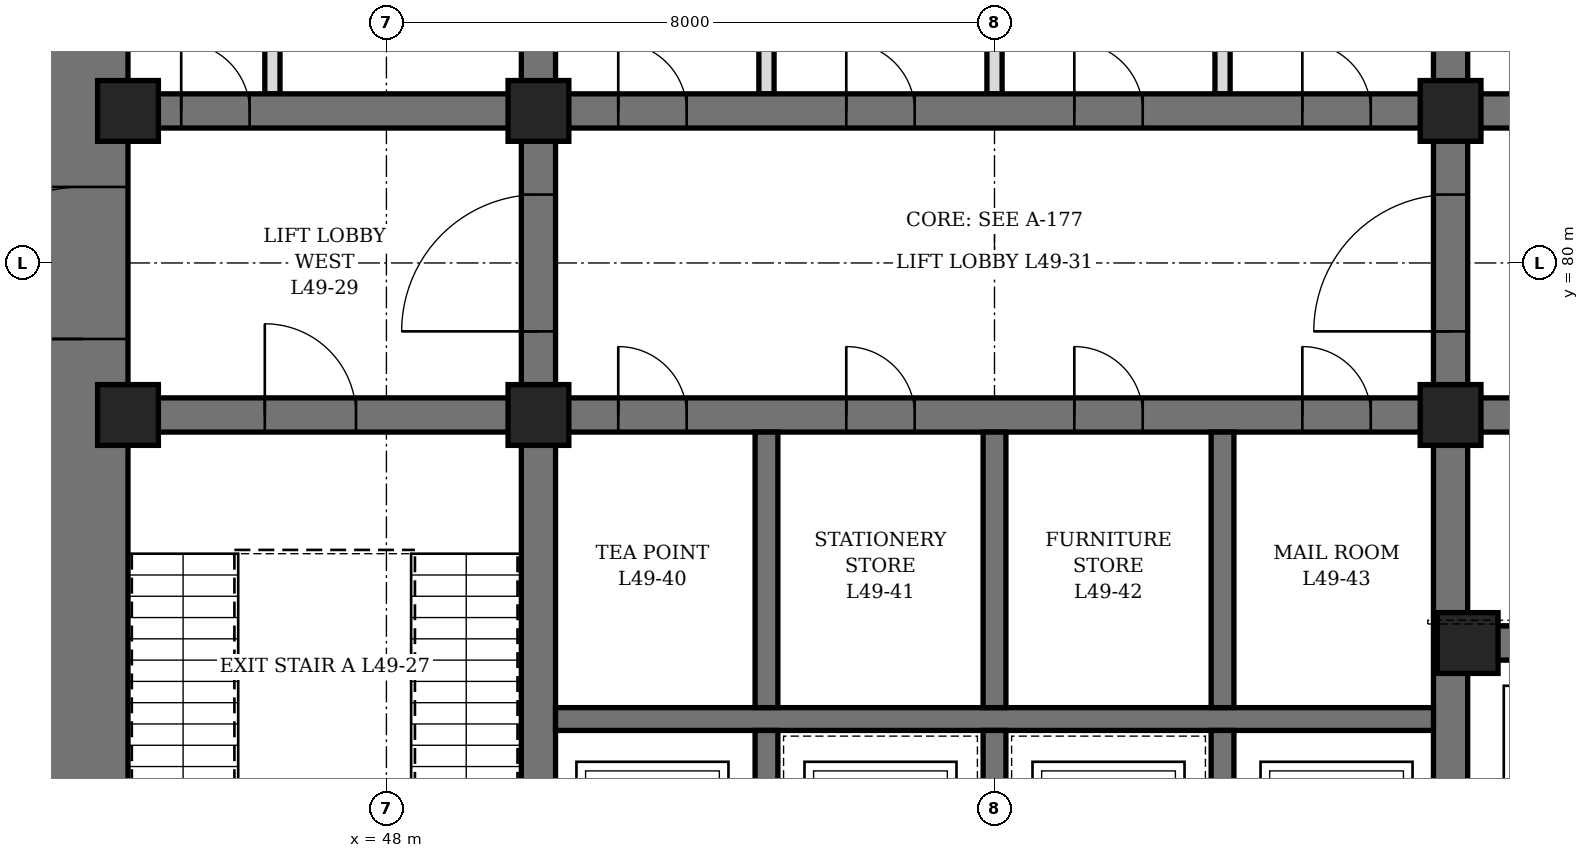
"""IFC4 building model, lengths in metres.
Left out: names, types, materials, properties, quantities, classifications, styles, units other than length and angle.
Written with IfcOpenShell. Run it as: python <this file> out.ifc"""

import sys

from ifc_helpers import new_model, si_unit, direction, frame, frame_2d, origin, origin_2d, place, context, subcontext, project, spatial, rectangle, hollow_rectangle, extrude, element, fill, save


model = new_model("IFC4")
c1 = context("Model", 3, precision=1e-05, world=origin(), true_north=direction((0.0, 1.0)))
c2 = subcontext(c1, "Body", "Model", "MODEL_VIEW")
j1 = project(units=[si_unit("LENGTHUNIT", "METRE"), si_unit("PLANEANGLEUNIT", "RADIAN")], contexts=[c1])
p1 = place(None, origin())
s1 = spatial("IfcSite", under=j1, at=p1, CompositionType="ELEMENT")
p2 = place(p1, origin())
s2 = spatial("IfcBuilding", under=s1, at=p2, CompositionType="ELEMENT")
p3 = place(p2, frame((0.0, 0.0, 219.1)))
s3 = spatial("IfcBuildingStorey", under=s2, at=p3, CompositionType="ELEMENT", Elevation=219.1)
p4 = place(p3, frame((44.0, 70.4, 0.0), z_axis=(0.0, 0.0, 1.0), x_axis=(0.0, 1.0, 0.0)))
e1 = element("IfcWall", 1, at=p4, inside=s3, PredefinedType="SHEAR", context=c2, shape_type="SweptSolid", body=[
    extrude(rectangle(XDim=19.2, YDim=1.2, at=frame_2d((9.6, 0.0))), origin(), (0.0, 0.0, 1.0), 4.2),
])
p5 = place(p4, frame((8.6, 0.0, 0.0)))
e2 = element("IfcOpeningElement", 2, at=p5, cuts=e1, PredefinedType="OPENING", context=c2, shape_type="SweptSolid", body=[
    extrude(rectangle(XDim=2.0, YDim=2.4, at=frame_2d((1.0, 1.2))), frame((0.0, 0.61, 0.0), z_axis=(0.0, -1.0, 0.0), x_axis=(1.0, 0.0, 0.0)), (0.0, 0.0, 1.0), 1.22),
])
p6 = place(p3, frame((50.0, 71.6, 0.0), z_axis=(0.0, 0.0, 1.0), x_axis=(0.0, 1.0, 0.0)))
e3 = element("IfcWall", 3, at=p6, inside=s3, PredefinedType="SHEAR", context=c2, shape_type="SweptSolid", body=[
    extrude(rectangle(XDim=16.8, YDim=0.45, at=frame_2d((8.4, 0.0))), origin(), (0.0, 0.0, 1.0), 4.2),
])
p7 = place(p6, frame((7.5, 0.0, 0.0)))
e4 = element("IfcOpeningElement", 4, at=p7, cuts=e3, PredefinedType="OPENING", context=c2, shape_type="SweptSolid", body=[
    extrude(rectangle(XDim=1.8, YDim=2.4, at=frame_2d((0.9, 1.2))), frame((0.0, 0.235, 0.0), z_axis=(0.0, -1.0, 0.0), x_axis=(1.0, 0.0, 0.0)), (0.0, 0.0, 1.0), 0.47),
])
p8 = place(p3, frame((62.0, 71.6, 0.0), z_axis=(0.0, 0.0, 1.0), x_axis=(0.0, 1.0, 0.0)))
e5 = element("IfcWall", 5, at=p8, inside=s3, PredefinedType="SHEAR", context=c2, shape_type="SweptSolid", body=[
    extrude(rectangle(XDim=16.8, YDim=0.45, at=frame_2d((8.4, 0.0))), origin(), (0.0, 0.0, 1.0), 4.2),
])
p9 = place(p8, frame((7.5, 0.0, 0.0)))
e6 = element("IfcOpeningElement", 6, at=p9, cuts=e5, PredefinedType="OPENING", context=c2, shape_type="SweptSolid", body=[
    extrude(rectangle(XDim=1.8, YDim=2.4, at=frame_2d((0.9, 1.2))), frame((0.0, 0.235, 0.0), z_axis=(0.0, -1.0, 0.0), x_axis=(1.0, 0.0, 0.0)), (0.0, 0.0, 1.0), 0.47),
])
p10 = place(p3, frame((44.6, 78.0, 0.0), z_axis=(0.0, 0.0, 1.0), x_axis=(1.0, 0.0, 0.0)))
e7 = element("IfcWall", 7, at=p10, inside=s3, PredefinedType="SHEAR", context=c2, shape_type="SweptSolid", body=[
    extrude(rectangle(XDim=5.175, YDim=0.45, at=frame_2d((2.587, 0.0))), origin(), (0.0, 0.0, 1.0), 4.2),
])
p11 = place(p10, frame((1.8, 0.0, 0.0)))
e8 = element("IfcOpeningElement", 8, at=p11, cuts=e7, PredefinedType="OPENING", context=c2, shape_type="SweptSolid", body=[
    extrude(rectangle(XDim=1.2, YDim=2.1, at=frame_2d((0.6, 1.05))), frame((0.0, 0.235, 0.0), z_axis=(0.0, -1.0, 0.0), x_axis=(1.0, 0.0, 0.0)), (0.0, 0.0, 1.0), 0.47),
])
p12 = place(p3, frame((44.6, 82.0, 0.0), z_axis=(0.0, 0.0, 1.0), x_axis=(1.0, 0.0, 0.0)))
e9 = element("IfcWall", 9, at=p12, inside=s3, PredefinedType="SHEAR", context=c2, shape_type="SweptSolid", body=[
    extrude(rectangle(XDim=5.175, YDim=0.45, at=frame_2d((2.587, 0.0))), origin(), (0.0, 0.0, 1.0), 4.2),
])
p13 = place(p12, frame((0.7, 0.0, 0.0)))
e10 = element("IfcOpeningElement", 10, at=p13, cuts=e9, PredefinedType="OPENING", context=c2, shape_type="SweptSolid", body=[
    extrude(rectangle(XDim=0.9, YDim=2.1, at=frame_2d((0.45, 1.05))), frame((0.0, 0.235, 0.0), z_axis=(0.0, -1.0, 0.0), x_axis=(1.0, 0.0, 0.0)), (0.0, 0.0, 1.0), 0.47),
])
p14 = place(p3, frame((62.225, 75.0, 0.0), z_axis=(0.0, 0.0, 1.0), x_axis=(1.0, 0.0, 0.0)))
e11 = element("IfcWall", 11, at=p14, inside=s3, PredefinedType="SHEAR", context=c2, shape_type="SweptSolid", body=[
    extrude(rectangle(XDim=5.175, YDim=0.45, at=frame_2d((2.587, 0.0))), origin(), (0.0, 0.0, 1.0), 4.2),
])
p15 = place(p14, frame((0.675, 0.0, 0.0)))
e12 = element("IfcOpeningElement", 12, at=p15, cuts=e11, PredefinedType="OPENING", context=c2, shape_type="SweptSolid", body=[
    extrude(rectangle(XDim=1.2, YDim=2.2, at=frame_2d((0.6, 1.1))), frame((0.0, 0.235, 0.0), z_axis=(0.0, -1.0, 0.0), x_axis=(1.0, 0.0, 0.0)), (0.0, 0.0, 1.0), 0.47),
])
p16 = place(p14, frame((3.425, 0.0, 0.0)))
e13 = element("IfcOpeningElement", 13, at=p16, cuts=e11, PredefinedType="OPENING", context=c2, shape_type="SweptSolid", body=[
    extrude(rectangle(XDim=1.2, YDim=2.2, at=frame_2d((0.6, 1.1))), frame((0.0, 0.235, 0.0), z_axis=(0.0, -1.0, 0.0), x_axis=(1.0, 0.0, 0.0)), (0.0, 0.0, 1.0), 0.47),
])
p17 = place(p3, frame((62.225, 78.0, 0.0), z_axis=(0.0, 0.0, 1.0), x_axis=(1.0, 0.0, 0.0)))
e14 = element("IfcWall", 14, at=p17, inside=s3, PredefinedType="SHEAR", context=c2, shape_type="SweptSolid", body=[
    extrude(rectangle(XDim=5.175, YDim=0.45, at=frame_2d((2.587, 0.0))), origin(), (0.0, 0.0, 1.0), 4.2),
])
p18 = place(p17, frame((2.175, 0.0, 0.0)))
e15 = element("IfcOpeningElement", 15, at=p18, cuts=e14, PredefinedType="OPENING", context=c2, shape_type="SweptSolid", body=[
    extrude(rectangle(XDim=1.2, YDim=2.1, at=frame_2d((0.6, 1.05))), frame((0.0, 0.235, 0.0), z_axis=(0.0, -1.0, 0.0), x_axis=(1.0, 0.0, 0.0)), (0.0, 0.0, 1.0), 0.47),
])
p19 = place(p3, frame((62.225, 82.0, 0.0), z_axis=(0.0, 0.0, 1.0), x_axis=(1.0, 0.0, 0.0)))
e16 = element("IfcWall", 16, at=p19, inside=s3, PredefinedType="SHEAR", context=c2, shape_type="SweptSolid", body=[
    extrude(rectangle(XDim=5.175, YDim=0.45, at=frame_2d((2.587, 0.0))), origin(), (0.0, 0.0, 1.0), 4.2),
])
p20 = place(p19, frame((2.175, 0.0, 0.0)))
e17 = element("IfcOpeningElement", 17, at=p20, cuts=e16, PredefinedType="OPENING", context=c2, shape_type="SweptSolid", body=[
    extrude(rectangle(XDim=1.2, YDim=2.1, at=frame_2d((0.6, 1.05))), frame((0.0, 0.235, 0.0), z_axis=(0.0, -1.0, 0.0), x_axis=(1.0, 0.0, 0.0)), (0.0, 0.0, 1.0), 0.47),
])
p21 = place(p3, frame((50.225, 78.0, 0.0), z_axis=(0.0, 0.0, 1.0), x_axis=(1.0, 0.0, 0.0)))
e18 = element("IfcWall", 18, at=p21, inside=s3, PredefinedType="SHEAR", context=c2, shape_type="SweptSolid", body=[
    extrude(rectangle(XDim=11.55, YDim=0.45, at=frame_2d((5.775, 0.0))), origin(), (0.0, 0.0, 1.0), 4.2),
])
p22 = place(p21, frame((0.825, 0.0, 0.0)))
e19 = element("IfcOpeningElement", 19, at=p22, cuts=e18, PredefinedType="OPENING", context=c2, shape_type="SweptSolid", body=[
    extrude(rectangle(XDim=0.9, YDim=2.1, at=frame_2d((0.45, 1.05))), frame((0.0, 0.235, 0.0), z_axis=(0.0, -1.0, 0.0), x_axis=(1.0, 0.0, 0.0)), (0.0, 0.0, 1.0), 0.47),
])
p23 = place(p21, frame((3.825, 0.0, 0.0)))
e20 = element("IfcOpeningElement", 20, at=p23, cuts=e18, PredefinedType="OPENING", context=c2, shape_type="SweptSolid", body=[
    extrude(rectangle(XDim=0.9, YDim=2.1, at=frame_2d((0.45, 1.05))), frame((0.0, 0.235, 0.0), z_axis=(0.0, -1.0, 0.0), x_axis=(1.0, 0.0, 0.0)), (0.0, 0.0, 1.0), 0.47),
])
p24 = place(p21, frame((6.825, 0.0, 0.0)))
e21 = element("IfcOpeningElement", 21, at=p24, cuts=e18, PredefinedType="OPENING", context=c2, shape_type="SweptSolid", body=[
    extrude(rectangle(XDim=0.9, YDim=2.1, at=frame_2d((0.45, 1.05))), frame((0.0, 0.235, 0.0), z_axis=(0.0, -1.0, 0.0), x_axis=(1.0, 0.0, 0.0)), (0.0, 0.0, 1.0), 0.47),
])
p25 = place(p21, frame((9.825, 0.0, 0.0)))
e22 = element("IfcOpeningElement", 22, at=p25, cuts=e18, PredefinedType="OPENING", context=c2, shape_type="SweptSolid", body=[
    extrude(rectangle(XDim=0.9, YDim=2.1, at=frame_2d((0.45, 1.05))), frame((0.0, 0.235, 0.0), z_axis=(0.0, -1.0, 0.0), x_axis=(1.0, 0.0, 0.0)), (0.0, 0.0, 1.0), 0.47),
])
p26 = place(p3, frame((50.225, 82.0, 0.0), z_axis=(0.0, 0.0, 1.0), x_axis=(1.0, 0.0, 0.0)))
e23 = element("IfcWall", 23, at=p26, inside=s3, PredefinedType="SHEAR", context=c2, shape_type="SweptSolid", body=[
    extrude(rectangle(XDim=11.55, YDim=0.45, at=frame_2d((5.775, 0.0))), origin(), (0.0, 0.0, 1.0), 4.2),
])
p27 = place(p26, frame((0.825, 0.0, 0.0)))
e24 = element("IfcOpeningElement", 24, at=p27, cuts=e23, PredefinedType="OPENING", context=c2, shape_type="SweptSolid", body=[
    extrude(rectangle(XDim=0.9, YDim=2.1, at=frame_2d((0.45, 1.05))), frame((0.0, 0.235, 0.0), z_axis=(0.0, -1.0, 0.0), x_axis=(1.0, 0.0, 0.0)), (0.0, 0.0, 1.0), 0.47),
])
p28 = place(p26, frame((3.825, 0.0, 0.0)))
e25 = element("IfcOpeningElement", 25, at=p28, cuts=e23, PredefinedType="OPENING", context=c2, shape_type="SweptSolid", body=[
    extrude(rectangle(XDim=0.9, YDim=2.1, at=frame_2d((0.45, 1.05))), frame((0.0, 0.235, 0.0), z_axis=(0.0, -1.0, 0.0), x_axis=(1.0, 0.0, 0.0)), (0.0, 0.0, 1.0), 0.47),
])
p29 = place(p26, frame((6.825, 0.0, 0.0)))
e26 = element("IfcOpeningElement", 26, at=p29, cuts=e23, PredefinedType="OPENING", context=c2, shape_type="SweptSolid", body=[
    extrude(rectangle(XDim=0.9, YDim=2.1, at=frame_2d((0.45, 1.05))), frame((0.0, 0.235, 0.0), z_axis=(0.0, -1.0, 0.0), x_axis=(1.0, 0.0, 0.0)), (0.0, 0.0, 1.0), 0.47),
])
p30 = place(p26, frame((9.825, 0.0, 0.0)))
e27 = element("IfcOpeningElement", 27, at=p30, cuts=e23, PredefinedType="OPENING", context=c2, shape_type="SweptSolid", body=[
    extrude(rectangle(XDim=0.9, YDim=2.1, at=frame_2d((0.45, 1.05))), frame((0.0, 0.235, 0.0), z_axis=(0.0, -1.0, 0.0), x_axis=(1.0, 0.0, 0.0)), (0.0, 0.0, 1.0), 0.47),
])
p31 = place(p3, frame((50.225, 74.0, 0.0), z_axis=(0.0, 0.0, 1.0), x_axis=(1.0, 0.0, 0.0)))
e28 = element("IfcWall", 28, at=p31, inside=s3, PredefinedType="SHEAR", context=c2, shape_type="SweptSolid", body=[
    extrude(rectangle(XDim=11.55, YDim=0.3, at=frame_2d((5.775, 0.0))), origin(), (0.0, 0.0, 1.0), 4.2),
])
p32 = place(p3, frame((53.0, 71.6, 0.0), z_axis=(0.0, 0.0, 1.0), x_axis=(0.0, 1.0, 0.0)))
e29 = element("IfcWall", 29, at=p32, inside=s3, PredefinedType="SHEAR", context=c2, shape_type="SweptSolid", body=[
    extrude(rectangle(XDim=2.25, YDim=0.3, at=frame_2d((1.125, 0.0))), origin(), (0.0, 0.0, 1.0), 4.2),
])
p33 = place(p3, frame((53.0, 74.15, 0.0), z_axis=(0.0, 0.0, 1.0), x_axis=(0.0, 1.0, 0.0)))
e30 = element("IfcWall", 30, at=p33, inside=s3, PredefinedType="SHEAR", context=c2, shape_type="SweptSolid", body=[
    extrude(rectangle(XDim=3.625, YDim=0.3, at=frame_2d((1.812, 0.0))), origin(), (0.0, 0.0, 1.0), 4.2),
])
p34 = place(p3, frame((56.0, 71.6, 0.0), z_axis=(0.0, 0.0, 1.0), x_axis=(0.0, 1.0, 0.0)))
e31 = element("IfcWall", 31, at=p34, inside=s3, PredefinedType="SHEAR", context=c2, shape_type="SweptSolid", body=[
    extrude(rectangle(XDim=2.25, YDim=0.3, at=frame_2d((1.125, 0.0))), origin(), (0.0, 0.0, 1.0), 4.2),
])
p35 = place(p3, frame((56.0, 74.15, 0.0), z_axis=(0.0, 0.0, 1.0), x_axis=(0.0, 1.0, 0.0)))
e32 = element("IfcWall", 32, at=p35, inside=s3, PredefinedType="SHEAR", context=c2, shape_type="SweptSolid", body=[
    extrude(rectangle(XDim=3.625, YDim=0.3, at=frame_2d((1.812, 0.0))), origin(), (0.0, 0.0, 1.0), 4.2),
])
p36 = place(p3, frame((59.0, 71.6, 0.0), z_axis=(0.0, 0.0, 1.0), x_axis=(0.0, 1.0, 0.0)))
e33 = element("IfcWall", 33, at=p36, inside=s3, PredefinedType="SHEAR", context=c2, shape_type="SweptSolid", body=[
    extrude(rectangle(XDim=2.25, YDim=0.3, at=frame_2d((1.125, 0.0))), origin(), (0.0, 0.0, 1.0), 4.2),
])
p37 = place(p3, frame((59.0, 74.15, 0.0), z_axis=(0.0, 0.0, 1.0), x_axis=(0.0, 1.0, 0.0)))
e34 = element("IfcWall", 34, at=p37, inside=s3, PredefinedType="SHEAR", context=c2, shape_type="SweptSolid", body=[
    extrude(rectangle(XDim=3.625, YDim=0.3, at=frame_2d((1.812, 0.0))), origin(), (0.0, 0.0, 1.0), 4.2),
])
for number, where, z_axis, x_axis in (
    (35, (44.6, 78.0, 0.0), (0.0, 0.0, 1.0), (1.0, 0.0, 0.0)),
    (36, (44.6, 82.0, 0.0), (0.0, 0.0, 1.0), (1.0, 0.0, 0.0)),
    (37, (50.0, 78.0, 0.0), (0.0, 0.0, 1.0), (1.0, 0.0, 0.0)),
    (38, (50.0, 82.0, 0.0), (0.0, 0.0, 1.0), (1.0, 0.0, 0.0)),
    (39, (62.0, 78.0, 0.0), (0.0, 0.0, 1.0), (1.0, 0.0, 0.0)),
    (40, (62.0, 82.0, 0.0), (0.0, 0.0, 1.0), (1.0, 0.0, 0.0)),
    (41, (62.225, 75.0, 0.0), (0.0, 0.0, 1.0), (1.0, 0.0, 0.0)),
):
    element("IfcColumn", number, at=place(p3, frame(where, z_axis=z_axis, x_axis=x_axis)), inside=s3, PredefinedType="COLUMN", context=c2, shape_type="SweptSolid", body=[
        extrude(hollow_rectangle(XDim=0.8, YDim=0.8, WallThickness=0.1, at=origin_2d()), origin(), (0.0, 0.0, 1.0), 4.2),
    ])
p38 = place(p3, frame((46.5, 82.225, 0.0), z_axis=(0.0, 0.0, 1.0), x_axis=(0.0, 1.0, 0.0)))
e42 = element("IfcWall", 42, at=p38, inside=s3, PredefinedType="PARTITIONING", context=c2, shape_type="SweptSolid", body=[
    extrude(rectangle(XDim=3.05, YDim=0.2, at=frame_2d((1.525, 0.0))), origin(), (0.0, 0.0, 1.0), 4.04),
])
p39 = place(p38, frame((1.075, 0.0, 0.0)))
e43 = element("IfcOpeningElement", 43, at=p39, cuts=e42, PredefinedType="OPENING", context=c2, shape_type="SweptSolid", body=[
    extrude(rectangle(XDim=0.9, YDim=2.1, at=frame_2d((0.45, 1.05))), frame((0.0, 0.11, 0.0), z_axis=(0.0, -1.0, 0.0), x_axis=(1.0, 0.0, 0.0)), (0.0, 0.0, 1.0), 0.22),
])
p40 = place(p3, frame((53.0, 82.225, 0.0), z_axis=(0.0, 0.0, 1.0), x_axis=(0.0, 1.0, 0.0)))
e44 = element("IfcWall", 44, at=p40, inside=s3, PredefinedType="PARTITIONING", context=c2, shape_type="SweptSolid", body=[
    extrude(rectangle(XDim=3.55, YDim=0.2, at=frame_2d((1.775, 0.0))), origin(), (0.0, 0.0, 1.0), 4.04),
])
p41 = place(p3, frame((56.0, 82.225, 0.0), z_axis=(0.0, 0.0, 1.0), x_axis=(0.0, 1.0, 0.0)))
e45 = element("IfcWall", 45, at=p41, inside=s3, PredefinedType="PARTITIONING", context=c2, shape_type="SweptSolid", body=[
    extrude(rectangle(XDim=3.55, YDim=0.2, at=frame_2d((1.775, 0.0))), origin(), (0.0, 0.0, 1.0), 3.14),
])
p42 = place(p3, frame((59.0, 82.225, 0.0), z_axis=(0.0, 0.0, 1.0), x_axis=(0.0, 1.0, 0.0)))
e46 = element("IfcWall", 46, at=p42, inside=s3, PredefinedType="PARTITIONING", context=c2, shape_type="SweptSolid", body=[
    extrude(rectangle(XDim=3.55, YDim=0.2, at=frame_2d((1.775, 0.0))), origin(), (0.0, 0.0, 1.0), 4.04),
])
p43 = place(p13, origin())
e47 = element("IfcDoor", 47, at=p43, inside=s3, OperationType="SINGLE_SWING_LEFT", PredefinedType="DOOR", context=c2, shape_type="SweptSolid", body=[
    extrude(rectangle(XDim=0.9, YDim=2.1, at=frame_2d((0.45, 1.05))), frame((0.0, 0.225, 0.0), z_axis=(0.0, -1.0, 0.0), x_axis=(1.0, 0.0, 0.0)), (0.0, 0.0, 1.0), 0.449),
])
fill(e10, e47)
p44 = place(p22, origin())
e48 = element("IfcDoor", 48, at=p44, inside=s3, OperationType="SINGLE_SWING_LEFT", PredefinedType="DOOR", context=c2, shape_type="SweptSolid", body=[
    extrude(rectangle(XDim=0.9, YDim=2.1, at=frame_2d((0.45, 1.05))), frame((0.0, 0.225, 0.0), z_axis=(0.0, -1.0, 0.0), x_axis=(1.0, 0.0, 0.0)), (0.0, 0.0, 1.0), 0.449),
])
fill(e19, e48)
p45 = place(p23, origin())
e49 = element("IfcDoor", 49, at=p45, inside=s3, OperationType="SINGLE_SWING_LEFT", PredefinedType="DOOR", context=c2, shape_type="SweptSolid", body=[
    extrude(rectangle(XDim=0.9, YDim=2.1, at=frame_2d((0.45, 1.05))), frame((0.0, 0.225, 0.0), z_axis=(0.0, -1.0, 0.0), x_axis=(1.0, 0.0, 0.0)), (0.0, 0.0, 1.0), 0.449),
])
fill(e20, e49)
p46 = place(p24, origin())
e50 = element("IfcDoor", 50, at=p46, inside=s3, OperationType="SINGLE_SWING_LEFT", PredefinedType="DOOR", context=c2, shape_type="SweptSolid", body=[
    extrude(rectangle(XDim=0.9, YDim=2.1, at=frame_2d((0.45, 1.05))), frame((0.0, 0.225, 0.0), z_axis=(0.0, -1.0, 0.0), x_axis=(1.0, 0.0, 0.0)), (0.0, 0.0, 1.0), 0.449),
])
fill(e21, e50)
p47 = place(p25, origin())
e51 = element("IfcDoor", 51, at=p47, inside=s3, OperationType="SINGLE_SWING_LEFT", PredefinedType="DOOR", context=c2, shape_type="SweptSolid", body=[
    extrude(rectangle(XDim=0.9, YDim=2.1, at=frame_2d((0.45, 1.05))), frame((0.0, 0.225, 0.0), z_axis=(0.0, -1.0, 0.0), x_axis=(1.0, 0.0, 0.0)), (0.0, 0.0, 1.0), 0.449),
])
fill(e22, e51)
p48 = place(p27, origin())
e52 = element("IfcDoor", 52, at=p48, inside=s3, OperationType="SINGLE_SWING_LEFT", PredefinedType="DOOR", context=c2, shape_type="SweptSolid", body=[
    extrude(rectangle(XDim=0.9, YDim=2.1, at=frame_2d((0.45, 1.05))), frame((0.0, 0.225, 0.0), z_axis=(0.0, -1.0, 0.0), x_axis=(1.0, 0.0, 0.0)), (0.0, 0.0, 1.0), 0.449),
])
fill(e24, e52)
p49 = place(p28, origin())
e53 = element("IfcDoor", 53, at=p49, inside=s3, OperationType="SINGLE_SWING_LEFT", PredefinedType="DOOR", context=c2, shape_type="SweptSolid", body=[
    extrude(rectangle(XDim=0.9, YDim=2.1, at=frame_2d((0.45, 1.05))), frame((0.0, 0.225, 0.0), z_axis=(0.0, -1.0, 0.0), x_axis=(1.0, 0.0, 0.0)), (0.0, 0.0, 1.0), 0.449),
])
fill(e25, e53)
p50 = place(p29, origin())
e54 = element("IfcDoor", 54, at=p50, inside=s3, OperationType="SINGLE_SWING_LEFT", PredefinedType="DOOR", context=c2, shape_type="SweptSolid", body=[
    extrude(rectangle(XDim=0.9, YDim=2.1, at=frame_2d((0.45, 1.05))), frame((0.0, 0.225, 0.0), z_axis=(0.0, -1.0, 0.0), x_axis=(1.0, 0.0, 0.0)), (0.0, 0.0, 1.0), 0.449),
])
fill(e26, e54)
p51 = place(p30, origin())
e55 = element("IfcDoor", 55, at=p51, inside=s3, OperationType="SINGLE_SWING_LEFT", PredefinedType="DOOR", context=c2, shape_type="SweptSolid", body=[
    extrude(rectangle(XDim=0.9, YDim=2.1, at=frame_2d((0.45, 1.05))), frame((0.0, 0.225, 0.0), z_axis=(0.0, -1.0, 0.0), x_axis=(1.0, 0.0, 0.0)), (0.0, 0.0, 1.0), 0.449),
])
fill(e27, e55)
p52 = place(p11, origin())
e56 = element("IfcDoor", 56, at=p52, inside=s3, OperationType="SINGLE_SWING_LEFT", PredefinedType="DOOR", context=c2, shape_type="SweptSolid", body=[
    extrude(rectangle(XDim=1.2, YDim=2.1, at=frame_2d((0.6, 1.05))), frame((0.0, 0.225, 0.0), z_axis=(0.0, -1.0, 0.0), x_axis=(1.0, 0.0, 0.0)), (0.0, 0.0, 1.0), 0.449),
])
fill(e8, e56)
p53 = place(p5, origin())
e57 = element("IfcDoor", 57, at=p53, inside=s3, OperationType="DOUBLE_DOOR_SINGLE_SWING", PredefinedType="DOOR", context=c2, shape_type="SweptSolid", body=[
    extrude(rectangle(XDim=2.0, YDim=2.4, at=frame_2d((1.0, 1.2))), frame((0.0, 0.35, 0.0), z_axis=(0.0, -1.0, 0.0), x_axis=(1.0, 0.0, 0.0)), (0.0, 0.0, 1.0), 0.7),
])
fill(e2, e57)
p54 = place(p7, origin())
e58 = element("IfcDoor", 58, at=p54, inside=s3, OperationType="DOUBLE_DOOR_SINGLE_SWING", PredefinedType="DOOR", context=c2, shape_type="SweptSolid", body=[
    extrude(rectangle(XDim=1.8, YDim=2.4, at=frame_2d((0.9, 1.2))), frame((0.0, 0.225, 0.0), z_axis=(0.0, -1.0, 0.0), x_axis=(1.0, 0.0, 0.0)), (0.0, 0.0, 1.0), 0.449),
])
fill(e4, e58)
p55 = place(p9, origin())
e59 = element("IfcDoor", 59, at=p55, inside=s3, OperationType="DOUBLE_DOOR_SINGLE_SWING", PredefinedType="DOOR", context=c2, shape_type="SweptSolid", body=[
    extrude(rectangle(XDim=1.8, YDim=2.4, at=frame_2d((0.9, 1.2))), frame((0.0, 0.225, 0.0), z_axis=(0.0, -1.0, 0.0), x_axis=(1.0, 0.0, 0.0)), (0.0, 0.0, 1.0), 0.449),
])
fill(e6, e59)
save(model, sys.argv[1])
